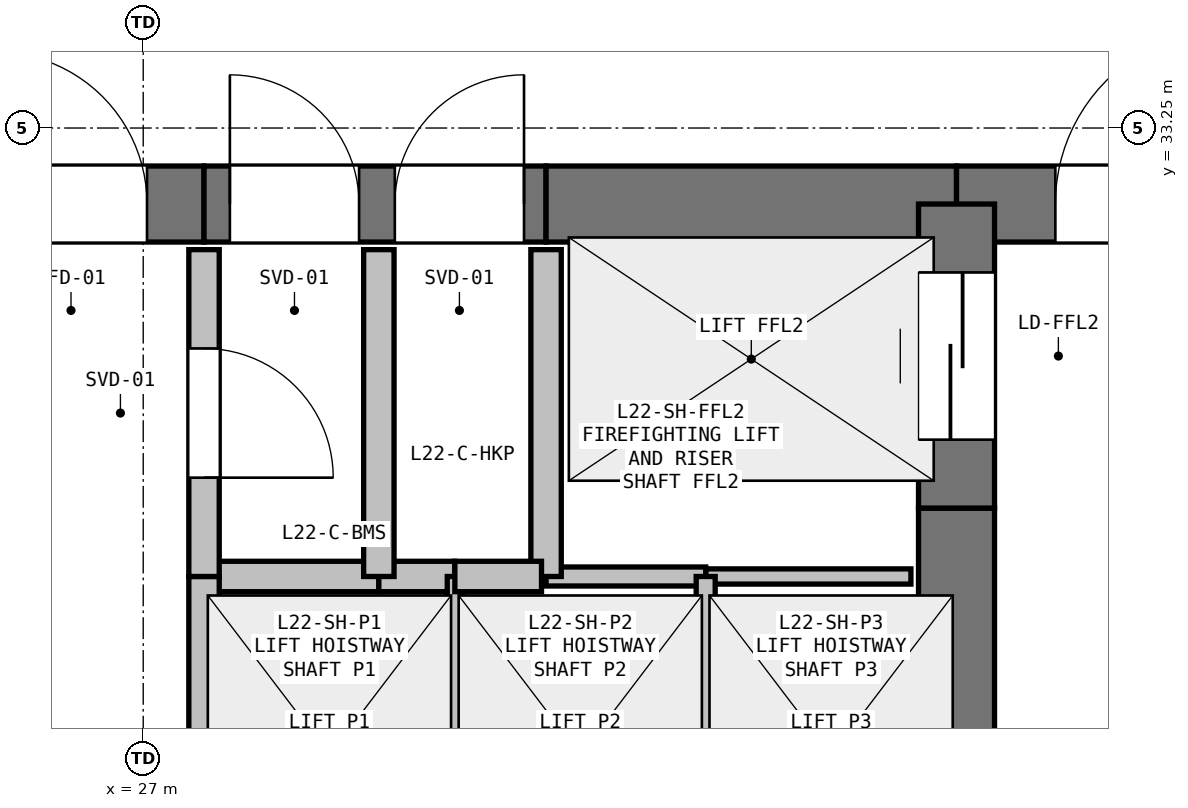
"""IFC4 building model, lengths in metres.
Left out: names, types, materials, properties, quantities, classifications, styles, units other than length and angle.
Written with IfcOpenShell. Run it as: python <this file> out.ifc"""

import sys

from ifc_helpers import new_model, si_unit, direction, frame, frame_2d, origin, place, context, subcontext, project, spatial, rectangle, extrude, element, fill, save


model = new_model("IFC4")
c1 = context("Model", 3, precision=1e-05, world=origin(), true_north=direction((0.0, 1.0)))
c2 = subcontext(c1, "Body", "Model", "MODEL_VIEW")
j1 = project(units=[si_unit("LENGTHUNIT", "METRE"), si_unit("PLANEANGLEUNIT", "RADIAN")], contexts=[c1])
p1 = place(None, origin())
s1 = spatial("IfcSite", under=j1, at=p1, CompositionType="ELEMENT")
p2 = place(p1, origin())
s2 = spatial("IfcBuilding", under=s1, at=p2, CompositionType="ELEMENT")
p3 = place(p2, frame((0.0, 0.0, 83.4)))
s3 = spatial("IfcBuildingStorey", under=s2, at=p3, CompositionType="ELEMENT", Elevation=83.4)
p4 = place(p3, frame((25.65, 32.75, 0.0), z_axis=(0.0, 0.0, 1.0), x_axis=(1.0, 0.0, 0.0)))
e1 = element("IfcWall", 1, at=p4, inside=s3, PredefinedType="SHEAR", context=c2, shape_type="SweptSolid", body=[
    extrude(rectangle(XDim=1.75, YDim=0.5, at=frame_2d((0.875, 0.0))), origin(), (0.0, 0.0, 1.0), 3.05),
])
p5 = place(p4, frame((0.375, 0.0, 0.0)))
e2 = element("IfcOpeningElement", 2, at=p5, cuts=e1, PredefinedType="OPENING", context=c2, shape_type="SweptSolid", body=[
    extrude(rectangle(XDim=1.0, YDim=2.15, at=frame_2d((0.5, 1.075))), frame((0.0, 0.26, 0.0), z_axis=(0.0, -1.0, 0.0), x_axis=(1.0, 0.0, 0.0)), (0.0, 0.0, 1.0), 0.52),
])
p6 = place(p3, frame((27.4, 32.75, 0.0), z_axis=(0.0, 0.0, 1.0), x_axis=(1.0, 0.0, 0.0)))
e3 = element("IfcWall", 3, at=p6, inside=s3, PredefinedType="SHEAR", context=c2, shape_type="SweptSolid", body=[
    extrude(rectangle(XDim=2.25, YDim=0.5, at=frame_2d((1.125, 0.0))), origin(), (0.0, 0.0, 1.0), 3.05),
])
p7 = place(p6, frame((0.17, 0.0, 0.0)))
e4 = element("IfcOpeningElement", 4, at=p7, cuts=e3, PredefinedType="OPENING", context=c2, shape_type="SweptSolid", body=[
    extrude(rectangle(XDim=0.85, YDim=2.1, at=frame_2d((0.425, 1.05))), frame((0.0, 0.26, 0.0), z_axis=(0.0, -1.0, 0.0), x_axis=(1.0, 0.0, 0.0)), (0.0, 0.0, 1.0), 0.52),
])
p8 = place(p6, frame((1.255, 0.0, 0.0)))
e5 = element("IfcOpeningElement", 5, at=p8, cuts=e3, PredefinedType="OPENING", context=c2, shape_type="SweptSolid", body=[
    extrude(rectangle(XDim=0.85, YDim=2.1, at=frame_2d((0.425, 1.05))), frame((0.0, 0.26, 0.0), z_axis=(0.0, -1.0, 0.0), x_axis=(1.0, 0.0, 0.0)), (0.0, 0.0, 1.0), 0.52),
])
p9 = place(p3, frame((29.65, 32.75, 0.0), z_axis=(0.0, 0.0, 1.0), x_axis=(1.0, 0.0, 0.0)))
e6 = element("IfcWall", 6, at=p9, inside=s3, PredefinedType="SHEAR", context=c2, shape_type="SweptSolid", body=[
    extrude(rectangle(XDim=2.7, YDim=0.5, at=frame_2d((1.35, 0.0))), origin(), (0.0, 0.0, 1.0), 3.05),
])
p10 = place(p3, frame((32.35, 32.75, 0.0), z_axis=(0.0, 0.0, 1.0), x_axis=(1.0, 0.0, 0.0)))
e7 = element("IfcWall", 7, at=p10, inside=s3, PredefinedType="SHEAR", context=c2, shape_type="SweptSolid", body=[
    extrude(rectangle(XDim=3.45, YDim=0.5, at=frame_2d((1.725, 0.0))), origin(), (0.0, 0.0, 1.0), 3.05),
])
p11 = place(p10, frame((0.65, 0.0, 0.0)))
e8 = element("IfcOpeningElement", 8, at=p11, cuts=e7, PredefinedType="OPENING", context=c2, shape_type="SweptSolid", body=[
    extrude(rectangle(XDim=1.15, YDim=2.15, at=frame_2d((0.575, 1.075))), frame((0.0, 0.26, 0.0), z_axis=(0.0, -1.0, 0.0), x_axis=(1.0, 0.0, 0.0)), (0.0, 0.0, 1.0), 0.52),
])
p12 = place(p3, frame((32.35, 27.95, 0.0), z_axis=(0.0, 0.0, 1.0), x_axis=(0.0, 1.0, 0.0)))
e9 = element("IfcWall", 9, at=p12, inside=s3, PredefinedType="SHEAR", context=c2, shape_type="SweptSolid", body=[
    extrude(rectangle(XDim=2.8, YDim=0.5, at=frame_2d((1.4, 0.0))), origin(), (0.0, 0.0, 1.0), 3.05),
])
p13 = place(p3, frame((32.35, 30.75, 0.0), z_axis=(0.0, 0.0, 1.0), x_axis=(0.0, 1.0, 0.0)))
e10 = element("IfcWall", 10, at=p13, inside=s3, PredefinedType="SHEAR", context=c2, shape_type="SweptSolid", body=[
    extrude(rectangle(XDim=2.0, YDim=0.5, at=frame_2d((1.0, 0.0))), origin(), (0.0, 0.0, 1.0), 3.05),
])
p14 = place(p13, frame((0.45, 0.0, 0.0)))
e11 = element("IfcOpeningElement", 11, at=p14, cuts=e10, PredefinedType="OPENING", context=c2, shape_type="SweptSolid", body=[
    extrude(rectangle(XDim=1.1, YDim=2.15, at=frame_2d((0.55, 1.075))), frame((0.0, 0.26, 0.0), z_axis=(0.0, -1.0, 0.0), x_axis=(1.0, 0.0, 0.0)), (0.0, 0.0, 1.0), 0.52),
])
p15 = place(p3, frame((32.05, 30.3, 0.0), z_axis=(0.0, 0.0, 1.0), x_axis=(-1.0, 0.0, 0.0)))
e12 = element("IfcWall", 12, at=p15, inside=s3, PredefinedType="PARTITIONING", context=c2, shape_type="SweptSolid", body=[
    extrude(rectangle(XDim=1.35, YDim=0.1, at=frame_2d((0.675, 0.0))), origin(), (0.0, 0.0, 1.0), 3.05),
])
p16 = place(p3, frame((30.7, 30.3, 0.0), z_axis=(0.0, 0.0, 1.0), x_axis=(-1.0, 0.0, 0.0)))
e13 = element("IfcWall", 13, at=p16, inside=s3, PredefinedType="PARTITIONING", context=c2, shape_type="SweptSolid", body=[
    extrude(rectangle(XDim=1.05, YDim=0.125, at=frame_2d((0.525, 0.0))), origin(), (0.0, 0.0, 1.0), 3.05),
])
p17 = place(p3, frame((29.65, 30.3, 0.0), z_axis=(0.0, 0.0, 1.0), x_axis=(0.0, 1.0, 0.0)))
e14 = element("IfcWall", 14, at=p17, inside=s3, PredefinedType="PARTITIONING", context=c2, shape_type="SweptSolid", body=[
    extrude(rectangle(XDim=2.15, YDim=0.2, at=frame_2d((1.075, 0.0))), origin(), (0.0, 0.0, 1.0), 3.05),
])
p18 = place(p3, frame((27.4, 30.3, 0.0), z_axis=(0.0, 0.0, 1.0), x_axis=(1.0, 0.0, 0.0)))
e15 = element("IfcWall", 15, at=p18, inside=s3, PredefinedType="PARTITIONING", context=c2, shape_type="SweptSolid", body=[
    extrude(rectangle(XDim=1.15, YDim=0.2, at=frame_2d((0.575, 0.0))), origin(), (0.0, 0.0, 1.0), 3.05),
])
p19 = place(p3, frame((28.55, 30.3, 0.0), z_axis=(0.0, 0.0, 1.0), x_axis=(1.0, 0.0, 0.0)))
e16 = element("IfcWall", 16, at=p19, inside=s3, PredefinedType="PARTITIONING", context=c2, shape_type="SweptSolid", body=[
    extrude(rectangle(XDim=0.5, YDim=0.2, at=frame_2d((0.25, 0.0))), origin(), (0.0, 0.0, 1.0), 3.05),
])
p20 = place(p3, frame((29.05, 30.3, 0.0), z_axis=(0.0, 0.0, 1.0), x_axis=(0.0, -1.0, 0.0)))
e17 = element("IfcWall", 17, at=p20, inside=s3, PredefinedType="PARTITIONING", context=c2, shape_type="SweptSolid", body=[
    extrude(rectangle(XDim=2.2, YDim=0.1, at=frame_2d((1.1, 0.0))), origin(), (0.0, 0.0, 1.0), 3.05),
])
p21 = place(p3, frame((27.4, 28.1, 0.0), z_axis=(0.0, 0.0, 1.0), x_axis=(0.0, 1.0, 0.0)))
e18 = element("IfcWall", 18, at=p21, inside=s3, PredefinedType="PARTITIONING", context=c2, shape_type="SweptSolid", body=[
    extrude(rectangle(XDim=2.2, YDim=0.2, at=frame_2d((1.1, 0.0))), origin(), (0.0, 0.0, 1.0), 3.05),
])
p22 = place(p3, frame((29.05, 30.3, 0.0), z_axis=(0.0, 0.0, 1.0), x_axis=(1.0, 0.0, 0.0)))
e19 = element("IfcWall", 19, at=p22, inside=s3, PredefinedType="PARTITIONING", context=c2, shape_type="SweptSolid", body=[
    extrude(rectangle(XDim=0.57, YDim=0.2, at=frame_2d((0.285, 0.0))), origin(), (0.0, 0.0, 1.0), 3.05),
])
p23 = place(p3, frame((30.7, 30.3, 0.0), z_axis=(0.0, 0.0, 1.0), x_axis=(0.0, -1.0, 0.0)))
e20 = element("IfcWall", 20, at=p23, inside=s3, PredefinedType="PARTITIONING", context=c2, shape_type="SweptSolid", body=[
    extrude(rectangle(XDim=2.2, YDim=0.125, at=frame_2d((1.1, 0.0))), origin(), (0.0, 0.0, 1.0), 3.05),
])
p24 = place(p3, frame((27.4, 32.45, 0.0), z_axis=(0.0, 0.0, 1.0), x_axis=(0.0, -1.0, 0.0)))
e21 = element("IfcWall", 21, at=p24, inside=s3, PredefinedType="PARTITIONING", context=c2, shape_type="SweptSolid", body=[
    extrude(rectangle(XDim=2.15, YDim=0.2, at=frame_2d((1.075, 0.0))), origin(), (0.0, 0.0, 1.0), 3.05),
])
p25 = place(p24, frame((0.65, 0.0, 0.0)))
e22 = element("IfcOpeningElement", 22, at=p25, cuts=e21, PredefinedType="OPENING", context=c2, shape_type="SweptSolid", body=[
    extrude(rectangle(XDim=0.85, YDim=2.1, at=frame_2d((0.425, 1.05))), frame((0.0, 0.11, 0.0), z_axis=(0.0, -1.0, 0.0), x_axis=(1.0, 0.0, 0.0)), (0.0, 0.0, 1.0), 0.22),
])
p26 = place(p3, frame((28.55, 32.45, 0.0), z_axis=(0.0, 0.0, 1.0), x_axis=(0.0, -1.0, 0.0)))
e23 = element("IfcWall", 23, at=p26, inside=s3, PredefinedType="PARTITIONING", context=c2, shape_type="SweptSolid", body=[
    extrude(rectangle(XDim=2.15, YDim=0.2, at=frame_2d((1.075, 0.0))), origin(), (0.0, 0.0, 1.0), 3.05),
])
p27 = place(p5, origin())
e24 = element("IfcDoor", 24, at=p27, inside=s3, OperationType="SINGLE_SWING_LEFT", PredefinedType="DOOR", context=c2, shape_type="SweptSolid", body=[
    extrude(rectangle(XDim=1.0, YDim=2.15, at=frame_2d((0.5, 1.075))), frame((0.0, 0.025, 0.0), z_axis=(0.0, -1.0, 0.0), x_axis=(1.0, 0.0, 0.0)), (0.0, 0.0, 1.0), 0.05),
])
fill(e2, e24)
p28 = place(p14, origin())
e25 = element("IfcDoor", 25, at=p28, inside=s3, OperationType="SLIDING_TO_LEFT", PredefinedType="DOOR", context=c2, shape_type="SweptSolid", body=[
    extrude(rectangle(XDim=1.1, YDim=2.15, at=frame_2d((0.55, 1.075))), frame((0.0, 0.025, 0.0), z_axis=(0.0, -1.0, 0.0), x_axis=(1.0, 0.0, 0.0)), (0.0, 0.0, 1.0), 0.05),
])
fill(e11, e25)
p29 = place(p11, origin())
e26 = element("IfcDoor", 26, at=p29, inside=s3, OperationType="SINGLE_SWING_RIGHT", PredefinedType="DOOR", context=c2, shape_type="SweptSolid", body=[
    extrude(rectangle(XDim=1.15, YDim=2.15, at=frame_2d((0.575, 1.075))), frame((0.0, 0.025, 0.0), z_axis=(0.0, -1.0, 0.0), x_axis=(1.0, 0.0, 0.0)), (0.0, 0.0, 1.0), 0.05),
])
fill(e8, e26)
p30 = place(p25, origin())
e27 = element("IfcDoor", 27, at=p30, inside=s3, OperationType="SINGLE_SWING_RIGHT", PredefinedType="DOOR", context=c2, shape_type="SweptSolid", body=[
    extrude(rectangle(XDim=0.85, YDim=2.1, at=frame_2d((0.425, 1.05))), frame((0.0, 0.025, 0.0), z_axis=(0.0, -1.0, 0.0), x_axis=(1.0, 0.0, 0.0)), (0.0, 0.0, 1.0), 0.05),
])
fill(e22, e27)
p31 = place(p7, origin())
e28 = element("IfcDoor", 28, at=p31, inside=s3, OperationType="SINGLE_SWING_LEFT", PredefinedType="DOOR", context=c2, shape_type="SweptSolid", body=[
    extrude(rectangle(XDim=0.85, YDim=2.1, at=frame_2d((0.425, 1.05))), frame((0.0, 0.025, 0.0), z_axis=(0.0, -1.0, 0.0), x_axis=(1.0, 0.0, 0.0)), (0.0, 0.0, 1.0), 0.05),
])
fill(e4, e28)
p32 = place(p8, origin())
e29 = element("IfcDoor", 29, at=p32, inside=s3, OperationType="SINGLE_SWING_RIGHT", PredefinedType="DOOR", context=c2, shape_type="SweptSolid", body=[
    extrude(rectangle(XDim=0.85, YDim=2.1, at=frame_2d((0.425, 1.05))), frame((0.0, 0.025, 0.0), z_axis=(0.0, -1.0, 0.0), x_axis=(1.0, 0.0, 0.0)), (0.0, 0.0, 1.0), 0.05),
])
fill(e5, e29)
save(model, sys.argv[1])
